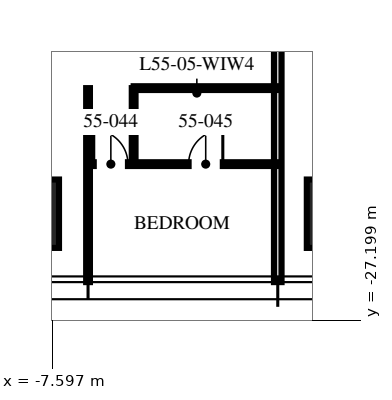
"""IFC4 building model, lengths in metres.
Left out: names, types, materials, properties, quantities, classifications, styles, units other than length and angle.
Written with IfcOpenShell. Run it as: python <this file> out.ifc"""

import sys

from ifc_helpers import new_model, si_unit, direction, frame, frame_2d, origin, origin_2d, place, context, subcontext, project, spatial, rectangle, extrude, element, fill, save


model = new_model("IFC4")
c1 = context("Model", 3, precision=1e-05, world=origin(), true_north=direction((0.0, 1.0)))
c2 = subcontext(c1, "Body", "Model", "MODEL_VIEW")
j1 = project(units=[si_unit("LENGTHUNIT", "METRE"), si_unit("PLANEANGLEUNIT", "RADIAN")], contexts=[c1])
p1 = place(None, origin())
s1 = spatial("IfcSite", under=j1, at=p1, CompositionType="ELEMENT")
p2 = place(p1, origin())
s2 = spatial("IfcBuilding", under=s1, at=p2, CompositionType="ELEMENT")
p3 = place(p2, frame((0.0, 0.0, 222.0)))
s3 = spatial("IfcBuildingStorey", under=s2, at=p3, CompositionType="ELEMENT", Elevation=222.0)
for number, where, z_axis, x_axis in (
    (1, (0.0, -24.4, 0.0), (0.0, 0.0, 1.0), (1.0, 0.0, 0.0)),
    (2, (-8.32, -24.4, 0.0), (0.0, 0.0, 1.0), (1.0, 0.0, 0.0)),
):
    element("IfcColumn", number, at=place(p3, frame(where, z_axis=z_axis, x_axis=x_axis)), inside=s3, PredefinedType="COLUMN", context=c2, shape_type="SweptSolid", body=[
        extrude(rectangle(XDim=1.8, YDim=1.8, at=origin_2d()), origin(), (0.0, 0.0, 1.0), 3.75),
    ])
p4 = place(p3, frame((-6.656, -21.095, 0.0), z_axis=(0.0, 0.0, 1.0), x_axis=(0.0, -1.0, 0.0)))
e3 = element("IfcWall", 3, at=p4, inside=s3, PredefinedType="PARTITIONING", context=c2, shape_type="SweptSolid", body=[
    extrude(rectangle(XDim=5.105, YDim=0.1, at=frame_2d((2.552, 0.0))), origin(), (0.0, 0.0, 1.0), 2.91),
])
p5 = place(p3, frame((-1.664, -12.8, 0.0), z_axis=(0.0, 0.0, 1.0), x_axis=(0.0, -1.0, 0.0)))
e4 = element("IfcWall", 4, at=p5, inside=s3, PredefinedType="PARTITIONING", context=c2, shape_type="SweptSolid", body=[
    extrude(rectangle(XDim=13.4, YDim=0.2, at=frame_2d((6.7, 0.0))), origin(), (0.0, 0.0, 1.0), 2.91),
])
p6 = place(p3, frame((-6.656, -23.095, 0.0), z_axis=(0.0, 0.0, 1.0), x_axis=(1.0, 0.0, 0.0)))
e5 = element("IfcWall", 5, at=p6, inside=s3, PredefinedType="PARTITIONING", context=c2, shape_type="SweptSolid", body=[
    extrude(rectangle(XDim=4.992, YDim=0.1, at=frame_2d((2.496, 0.0))), origin(), (0.0, 0.0, 1.0), 2.81),
])
p7 = place(p6, frame((0.15, 0.0, 0.0)))
e6 = element("IfcOpeningElement", 6, at=p7, cuts=e5, PredefinedType="OPENING", context=c2, shape_type="SweptSolid", body=[
    extrude(rectangle(XDim=0.9, YDim=2.1, at=frame_2d((0.45, 1.05))), frame((0.0, 0.06, 0.0), z_axis=(0.0, -1.0, 0.0), x_axis=(1.0, 0.0, 0.0)), (0.0, 0.0, 1.0), 0.12),
])
p8 = place(p6, frame((2.646, 0.0, 0.0)))
e7 = element("IfcOpeningElement", 7, at=p8, cuts=e5, PredefinedType="OPENING", context=c2, shape_type="SweptSolid", body=[
    extrude(rectangle(XDim=0.9, YDim=2.1, at=frame_2d((0.45, 1.05))), frame((0.0, 0.06, 0.0), z_axis=(0.0, -1.0, 0.0), x_axis=(1.0, 0.0, 0.0)), (0.0, 0.0, 1.0), 0.12),
])
p9 = place(p3, frame((-5.456, -21.095, 0.0), z_axis=(0.0, 0.0, 1.0), x_axis=(0.0, -1.0, 0.0)))
e8 = element("IfcWall", 8, at=p9, inside=s3, PredefinedType="PARTITIONING", context=c2, shape_type="SweptSolid", body=[
    extrude(rectangle(XDim=2.0, YDim=0.1, at=frame_2d((1.0, 0.0))), origin(), (0.0, 0.0, 1.0), 3.5),
])
p10 = place(p3, frame((-5.456, -21.095, 0.0), z_axis=(0.0, 0.0, 1.0), x_axis=(1.0, 0.0, 0.0)))
e9 = element("IfcWall", 9, at=p10, inside=s3, PredefinedType="PARTITIONING", context=c2, shape_type="SweptSolid", body=[
    extrude(rectangle(XDim=3.792, YDim=0.1, at=frame_2d((1.896, 0.0))), origin(), (0.0, 0.0, 1.0), 2.81),
])
p11 = place(p7, origin())
e10 = element("IfcDoor", 10, at=p11, inside=s3, OperationType="SINGLE_SWING_LEFT", PredefinedType="DOOR", context=c2, shape_type="SweptSolid", body=[
    extrude(rectangle(XDim=0.9, YDim=2.1, at=frame_2d((0.45, 1.05))), frame((0.0, 0.025, 0.0), z_axis=(0.0, -1.0, 0.0), x_axis=(1.0, 0.0, 0.0)), (0.0, 0.0, 1.0), 0.05),
])
fill(e6, e10)
p12 = place(p8, origin())
e11 = element("IfcDoor", 11, at=p12, inside=s3, OperationType="SINGLE_SWING_RIGHT", PredefinedType="DOOR", context=c2, shape_type="SweptSolid", body=[
    extrude(rectangle(XDim=0.9, YDim=2.1, at=frame_2d((0.45, 1.05))), frame((0.0, 0.025, 0.0), z_axis=(0.0, -1.0, 0.0), x_axis=(1.0, 0.0, 0.0)), (0.0, 0.0, 1.0), 0.05),
])
fill(e7, e11)
save(model, sys.argv[1])
